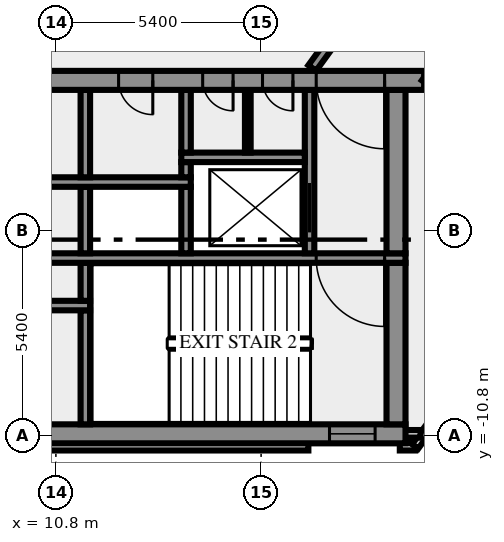
"""IFC4 building model, lengths in metres.
Left out: names, types, materials, properties, quantities, classifications, styles, units other than length and angle.
Written with IfcOpenShell. Run it as: python <this file> out.ifc"""

import sys

from ifc_helpers import new_model, si_unit, direction, frame, frame_2d, origin, place, context, subcontext, project, spatial, rectangle, extrude, element, fill, save


model = new_model("IFC4")
c1 = context("Model", 3, precision=1e-05, world=origin(), true_north=direction((0.0, 1.0)))
c2 = subcontext(c1, "Body", "Model", "MODEL_VIEW")
j1 = project(units=[si_unit("LENGTHUNIT", "METRE"), si_unit("PLANEANGLEUNIT", "RADIAN")], contexts=[c1])
p1 = place(None, origin())
s1 = spatial("IfcSite", under=j1, at=p1, CompositionType="ELEMENT")
p2 = place(p1, origin())
s2 = spatial("IfcBuilding", under=s1, at=p2, CompositionType="ELEMENT")
p3 = place(p2, frame((0.0, 0.0, 261.0)))
s3 = spatial("IfcBuildingStorey", under=s2, at=p3, CompositionType="ELEMENT", Elevation=261.0)
p4 = place(p3, frame((-17.444, -11.088, 0.0), z_axis=(0.0, 0.0, 1.0), x_axis=(1.0, 0.0, 0.0)))
e1 = element("IfcWall", 1, at=p4, inside=s3, PredefinedType="SOLIDWALL", context=c2, shape_type="SweptSolid", body=[
    extrude(rectangle(XDim=34.888, YDim=0.2, at=frame_2d((17.444, 0.0))), origin(), (0.0, 0.0, 1.0), 3.65),
])
p5 = place(p3, frame((19.85, -11.088, 0.0), z_axis=(0.0, 0.0, 1.0), x_axis=(1.0, 0.0, 0.0)))
e2 = element("IfcWall", 2, at=p5, inside=s3, PredefinedType="SOLIDWALL", context=c2, shape_type="SweptSolid", body=[
    extrude(rectangle(XDim=0.406, YDim=0.2, at=frame_2d((0.203, 0.0))), origin(), (0.0, 0.0, 1.0), 3.65),
])
p6 = place(p3, frame((20.253, -11.083, 0.0), z_axis=(0.0, 0.0, 1.0), x_axis=(0.587766567315, 0.809030569476, 0.0)))
e3 = element("IfcWall", 3, at=p6, inside=s3, PredefinedType="SOLIDWALL", context=c2, shape_type="SweptSolid", body=[
    extrude(rectangle(XDim=2.688, YDim=0.2, at=frame_2d((1.344, 0.0))), origin(), (0.0, 0.0, 1.0), 3.65),
])
p7 = place(p3, frame((19.98, -10.75, 0.0), z_axis=(0.0, 0.0, 1.0), x_axis=(1.0, 0.0, 0.0)))
e4 = element("IfcWall", 4, at=p7, inside=s3, PredefinedType="SOLIDWALL", context=c2, shape_type="SweptSolid", body=[
    extrude(rectangle(XDim=0.417, YDim=0.2, at=frame_2d((0.208, 0.0))), origin(), (0.0, 0.0, 1.0), 3.65),
])
p8 = place(p3, frame((-20.0, -10.75, 0.0), z_axis=(0.0, 0.0, 1.0), x_axis=(1.0, 0.0, 0.0)))
e5 = element("IfcWall", 5, at=p8, inside=s3, PredefinedType="SHEAR", context=c2, shape_type="SweptSolid", body=[
    extrude(rectangle(XDim=40.0, YDim=0.5, at=frame_2d((20.0, 0.0))), origin(), (0.0, 0.0, 1.0), 3.65),
])
p9 = place(p8, frame((0.8, 0.0, 1.0)))
e6 = element("IfcOpeningElement", 6, at=p9, cuts=e5, PredefinedType="OPENING", context=c2, shape_type="SweptSolid", body=[
    extrude(rectangle(XDim=1.2, YDim=1.2, at=frame_2d((0.6, 0.6))), frame((0.0, 0.26, 0.0), z_axis=(0.0, -1.0, 0.0), x_axis=(1.0, 0.0, 0.0)), (0.0, 0.0, 1.0), 0.52),
])
p10 = place(p8, frame((38.0, 0.0, 1.0)))
e7 = element("IfcOpeningElement", 7, at=p10, cuts=e5, PredefinedType="OPENING", context=c2, shape_type="SweptSolid", body=[
    extrude(rectangle(XDim=1.2, YDim=1.2, at=frame_2d((0.6, 0.6))), frame((0.0, 0.26, 0.0), z_axis=(0.0, -1.0, 0.0), x_axis=(1.0, 0.0, 0.0)), (0.0, 0.0, 1.0), 0.52),
])
p11 = place(p3, frame((11.575, -10.5, 0.0), z_axis=(0.0, 0.0, 1.0), x_axis=(0.0, 1.0, 0.0)))
e8 = element("IfcWall", 8, at=p11, inside=s3, PredefinedType="SHEAR", context=c2, shape_type="SweptSolid", body=[
    extrude(rectangle(XDim=3.0, YDim=0.25, at=frame_2d((1.5, 0.0))), origin(), (0.0, 0.0, 1.0), 3.65),
])
p12 = place(p3, frame((19.75, -10.5, 0.0), z_axis=(0.0, 0.0, 1.0), x_axis=(0.0, 1.0, 0.0)))
e9 = element("IfcWall", 9, at=p12, inside=s3, PredefinedType="SHEAR", context=c2, shape_type="SweptSolid", body=[
    extrude(rectangle(XDim=4.25, YDim=0.5, at=frame_2d((2.125, 0.0))), origin(), (0.0, 0.0, 1.0), 3.65),
])
p13 = place(p3, frame((11.7, -7.375, 0.0), z_axis=(0.0, 0.0, 1.0), x_axis=(-1.0, 0.0, 0.0)))
e10 = element("IfcWall", 10, at=p13, inside=s3, PredefinedType="SHEAR", context=c2, shape_type="SweptSolid", body=[
    extrude(rectangle(XDim=23.4, YDim=0.25, at=frame_2d((11.7, 0.0))), origin(), (0.0, 0.0, 1.0), 3.65),
])
p14 = place(p13, frame((22.225, 0.0, 0.0)))
e11 = element("IfcOpeningElement", 11, at=p14, cuts=e10, PredefinedType="OPENING", context=c2, shape_type="SweptSolid", body=[
    extrude(rectangle(XDim=0.8, YDim=2.1, at=frame_2d((0.4, 1.05))), frame((0.0, 0.135, 0.0), z_axis=(0.0, -1.0, 0.0), x_axis=(1.0, 0.0, 0.0)), (0.0, 0.0, 1.0), 0.27),
])
p15 = place(p13, frame((20.2, 0.0, 0.0)))
e12 = element("IfcOpeningElement", 12, at=p15, cuts=e10, PredefinedType="OPENING", context=c2, shape_type="SweptSolid", body=[
    extrude(rectangle(XDim=1.1, YDim=2.1, at=frame_2d((0.55, 1.05))), frame((0.0, 0.135, 0.0), z_axis=(0.0, -1.0, 0.0), x_axis=(1.0, 0.0, 0.0)), (0.0, 0.0, 1.0), 0.27),
])
p16 = place(p13, frame((17.7, 0.0, 0.0)))
e13 = element("IfcOpeningElement", 13, at=p16, cuts=e10, PredefinedType="OPENING", context=c2, shape_type="SweptSolid", body=[
    extrude(rectangle(XDim=1.1, YDim=2.1, at=frame_2d((0.55, 1.05))), frame((0.0, 0.135, 0.0), z_axis=(0.0, -1.0, 0.0), x_axis=(1.0, 0.0, 0.0)), (0.0, 0.0, 1.0), 0.27),
])
p17 = place(p13, frame((15.975, 0.0, 0.0)))
e14 = element("IfcOpeningElement", 14, at=p17, cuts=e10, PredefinedType="OPENING", context=c2, shape_type="SweptSolid", body=[
    extrude(rectangle(XDim=0.8, YDim=2.1, at=frame_2d((0.4, 1.05))), frame((0.0, 0.135, 0.0), z_axis=(0.0, -1.0, 0.0), x_axis=(1.0, 0.0, 0.0)), (0.0, 0.0, 1.0), 0.27),
])
p18 = place(p13, frame((14.75, 0.0, 0.0)))
e15 = element("IfcOpeningElement", 15, at=p18, cuts=e10, PredefinedType="OPENING", context=c2, shape_type="SweptSolid", body=[
    extrude(rectangle(XDim=0.7, YDim=2.1, at=frame_2d((0.35, 1.05))), frame((0.0, 0.135, 0.0), z_axis=(0.0, -1.0, 0.0), x_axis=(1.0, 0.0, 0.0)), (0.0, 0.0, 1.0), 0.27),
])
p19 = place(p13, frame((13.35, 0.0, 0.0)))
e16 = element("IfcOpeningElement", 16, at=p19, cuts=e10, PredefinedType="OPENING", context=c2, shape_type="SweptSolid", body=[
    extrude(rectangle(XDim=0.9, YDim=2.1, at=frame_2d((0.45, 1.05))), frame((0.0, 0.135, 0.0), z_axis=(0.0, -1.0, 0.0), x_axis=(1.0, 0.0, 0.0)), (0.0, 0.0, 1.0), 0.27),
])
p20 = place(p13, frame((11.975, 0.0, 0.0)))
e17 = element("IfcOpeningElement", 17, at=p20, cuts=e10, PredefinedType="OPENING", context=c2, shape_type="SweptSolid", body=[
    extrude(rectangle(XDim=0.9, YDim=2.1, at=frame_2d((0.45, 1.05))), frame((0.0, 0.135, 0.0), z_axis=(0.0, -1.0, 0.0), x_axis=(1.0, 0.0, 0.0)), (0.0, 0.0, 1.0), 0.27),
])
p21 = place(p13, frame((10.5, 0.0, 0.0)))
e18 = element("IfcOpeningElement", 18, at=p21, cuts=e10, PredefinedType="OPENING", context=c2, shape_type="SweptSolid", body=[
    extrude(rectangle(XDim=0.9, YDim=2.1, at=frame_2d((0.45, 1.05))), frame((0.0, 0.135, 0.0), z_axis=(0.0, -1.0, 0.0), x_axis=(1.0, 0.0, 0.0)), (0.0, 0.0, 1.0), 0.27),
])
p22 = place(p13, frame((8.388, 0.0, 0.0)))
e19 = element("IfcOpeningElement", 19, at=p22, cuts=e10, PredefinedType="OPENING", context=c2, shape_type="SweptSolid", body=[
    extrude(rectangle(XDim=0.9, YDim=2.1, at=frame_2d((0.45, 1.05))), frame((0.0, 0.135, 0.0), z_axis=(0.0, -1.0, 0.0), x_axis=(1.0, 0.0, 0.0)), (0.0, 0.0, 1.0), 0.27),
])
p23 = place(p13, frame((5.375, 0.0, 0.0)))
e20 = element("IfcOpeningElement", 20, at=p23, cuts=e10, PredefinedType="OPENING", context=c2, shape_type="SweptSolid", body=[
    extrude(rectangle(XDim=0.9, YDim=2.1, at=frame_2d((0.45, 1.05))), frame((0.0, 0.135, 0.0), z_axis=(0.0, -1.0, 0.0), x_axis=(1.0, 0.0, 0.0)), (0.0, 0.0, 1.0), 0.27),
])
p24 = place(p13, frame((1.688, 0.0, 0.0)))
e21 = element("IfcOpeningElement", 21, at=p24, cuts=e10, PredefinedType="OPENING", context=c2, shape_type="SweptSolid", body=[
    extrude(rectangle(XDim=0.9, YDim=2.1, at=frame_2d((0.45, 1.05))), frame((0.0, 0.135, 0.0), z_axis=(0.0, -1.0, 0.0), x_axis=(1.0, 0.0, 0.0)), (0.0, 0.0, 1.0), 0.27),
])
p25 = place(p3, frame((11.575, -7.25, 0.0), z_axis=(0.0, 0.0, 1.0), x_axis=(0.0, 1.0, 0.0)))
e22 = element("IfcWall", 22, at=p25, inside=s3, PredefinedType="SHEAR", context=c2, shape_type="SweptSolid", body=[
    extrude(rectangle(XDim=1.0, YDim=0.25, at=frame_2d((0.5, 0.0))), origin(), (0.0, 0.0, 1.0), 3.65),
])
p26 = place(p3, frame((20.0, -6.125, 0.0), z_axis=(0.0, 0.0, 1.0), x_axis=(-1.0, 0.0, 0.0)))
e23 = element("IfcWall", 23, at=p26, inside=s3, PredefinedType="SHEAR", context=c2, shape_type="SweptSolid", body=[
    extrude(rectangle(XDim=10.2, YDim=0.25, at=frame_2d((5.1, 0.0))), origin(), (0.0, 0.0, 1.0), 3.65),
])
p27 = place(p26, frame((0.55, 0.0, 0.0)))
e24 = element("IfcOpeningElement", 24, at=p27, cuts=e23, PredefinedType="OPENING", context=c2, shape_type="SweptSolid", body=[
    extrude(rectangle(XDim=1.8, YDim=2.1, at=frame_2d((0.9, 1.05))), frame((0.0, 0.135, 0.0), z_axis=(0.0, -1.0, 0.0), x_axis=(1.0, 0.0, 0.0)), (0.0, 0.0, 1.0), 0.27),
])
for number, where, z_axis, x_axis in (
    (25, (11.575, -6.0, 0.0), (0.0, 0.0, 1.0), (0.0, 1.0, 0.0)),
    (26, (14.225, -6.0, 0.0), (0.0, 0.0, 1.0), (0.0, 1.0, 0.0)),
):
    element("IfcWall", number, at=place(p3, frame(where, z_axis=z_axis, x_axis=x_axis)), inside=s3, PredefinedType="SHEAR", context=c2, shape_type="SweptSolid", body=[
        extrude(rectangle(XDim=1.75, YDim=0.25, at=frame_2d((0.875, 0.0))), origin(), (0.0, 0.0, 1.0), 3.65),
    ])
p28 = place(p3, frame((17.475, -6.0, 0.0), z_axis=(0.0, 0.0, 1.0), x_axis=(0.0, 1.0, 0.0)))
e27 = element("IfcWall", 27, at=p28, inside=s3, PredefinedType="SHEAR", context=c2, shape_type="SweptSolid", body=[
    extrude(rectangle(XDim=4.3, YDim=0.25, at=frame_2d((2.15, 0.0))), origin(), (0.0, 0.0, 1.0), 3.65),
])
p29 = place(p28, frame((0.55, 0.0, 0.0)))
e28 = element("IfcOpeningElement", 28, at=p29, cuts=e27, PredefinedType="OPENING", context=c2, shape_type="SweptSolid", body=[
    extrude(rectangle(XDim=1.3, YDim=2.1, at=frame_2d((0.65, 1.05))), frame((0.0, 0.135, 0.0), z_axis=(0.0, -1.0, 0.0), x_axis=(1.0, 0.0, 0.0)), (0.0, 0.0, 1.0), 0.27),
])
p30 = place(p3, frame((19.75, -6.0, 0.0), z_axis=(0.0, 0.0, 1.0), x_axis=(0.0, 1.0, 0.0)))
e29 = element("IfcWall", 29, at=p30, inside=s3, PredefinedType="SHEAR", context=c2, shape_type="SweptSolid", body=[
    extrude(rectangle(XDim=4.3, YDim=0.5, at=frame_2d((2.15, 0.0))), origin(), (0.0, 0.0, 1.0), 3.65),
])
p31 = place(p3, frame((-0.6, -4.125, 0.0), z_axis=(0.0, 0.0, 1.0), x_axis=(1.0, 0.0, 0.0)))
e30 = element("IfcWall", 30, at=p31, inside=s3, PredefinedType="SHEAR", context=c2, shape_type="SweptSolid", body=[
    extrude(rectangle(XDim=14.95, YDim=0.25, at=frame_2d((7.475, 0.0))), origin(), (0.0, 0.0, 1.0), 3.65),
])
p32 = place(p31, frame((2.75, 0.0, 0.0)))
e31 = element("IfcOpeningElement", 31, at=p32, cuts=e30, PredefinedType="OPENING", context=c2, shape_type="SweptSolid", body=[
    extrude(rectangle(XDim=1.3, YDim=2.1, at=frame_2d((0.65, 1.05))), frame((0.0, 0.135, 0.0), z_axis=(0.0, -1.0, 0.0), x_axis=(1.0, 0.0, 0.0)), (0.0, 0.0, 1.0), 0.27),
])
p33 = place(p3, frame((11.575, -4.0, 0.0), z_axis=(0.0, 0.0, 1.0), x_axis=(0.0, 1.0, 0.0)))
e32 = element("IfcWall", 32, at=p33, inside=s3, PredefinedType="SHEAR", context=c2, shape_type="SweptSolid", body=[
    extrude(rectangle(XDim=2.3, YDim=0.25, at=frame_2d((1.15, 0.0))), origin(), (0.0, 0.0, 1.0), 3.65),
])
p34 = place(p3, frame((14.225, -4.0, 0.0), z_axis=(0.0, 0.0, 1.0), x_axis=(0.0, 1.0, 0.0)))
e33 = element("IfcWall", 33, at=p34, inside=s3, PredefinedType="SHEAR", context=c2, shape_type="SweptSolid", body=[
    extrude(rectangle(XDim=0.4, YDim=0.25, at=frame_2d((0.2, 0.0))), origin(), (0.0, 0.0, 1.0), 3.65),
])
p35 = place(p3, frame((14.1, -3.475, 0.0), z_axis=(0.0, 0.0, 1.0), x_axis=(1.0, 0.0, 0.0)))
e34 = element("IfcWall", 34, at=p35, inside=s3, PredefinedType="SHEAR", context=c2, shape_type="SweptSolid", body=[
    extrude(rectangle(XDim=3.25, YDim=0.25, at=frame_2d((1.625, 0.0))), origin(), (0.0, 0.0, 1.0), 3.65),
])
p36 = place(p3, frame((14.225, -3.35, 0.0), z_axis=(0.0, 0.0, 1.0), x_axis=(0.0, 1.0, 0.0)))
e35 = element("IfcWall", 35, at=p36, inside=s3, PredefinedType="SHEAR", context=c2, shape_type="SweptSolid", body=[
    extrude(rectangle(XDim=1.65, YDim=0.25, at=frame_2d((0.825, 0.0))), origin(), (0.0, 0.0, 1.0), 3.65),
])
p37 = place(p3, frame((15.85, -3.35, 0.0), z_axis=(0.0, 0.0, 1.0), x_axis=(0.0, 1.0, 0.0)))
e36 = element("IfcWall", 36, at=p37, inside=s3, PredefinedType="PARTITIONING", context=c2, shape_type="SweptSolid", body=[
    extrude(rectangle(XDim=1.65, YDim=0.15, at=frame_2d((0.825, 0.0))), origin(), (0.0, 0.0, 1.0), 3.65),
])
p38 = place(p3, frame((20.49, -1.45, 0.0), z_axis=(0.0, 0.0, 1.0), x_axis=(-1.0, 0.0, 0.0)))
e37 = element("IfcWall", 37, at=p38, inside=s3, PredefinedType="SHEAR", context=c2, shape_type="SweptSolid", body=[
    extrude(rectangle(XDim=40.98, YDim=0.5, at=frame_2d((20.49, 0.0))), origin(), (0.0, 0.0, 1.0), 3.65),
])
p39 = place(p38, frame((38.14, 0.0, 0.0)))
e38 = element("IfcOpeningElement", 38, at=p39, cuts=e37, PredefinedType="OPENING", context=c2, shape_type="SweptSolid", body=[
    extrude(rectangle(XDim=1.8, YDim=2.1, at=frame_2d((0.9, 1.05))), frame((0.0, 0.26, 0.0), z_axis=(0.0, -1.0, 0.0), x_axis=(1.0, 0.0, 0.0)), (0.0, 0.0, 1.0), 0.52),
])
p40 = place(p38, frame((35.89, 0.0, 0.0)))
e39 = element("IfcOpeningElement", 39, at=p40, cuts=e37, PredefinedType="OPENING", context=c2, shape_type="SweptSolid", body=[
    extrude(rectangle(XDim=0.9, YDim=2.1, at=frame_2d((0.45, 1.05))), frame((0.0, 0.26, 0.0), z_axis=(0.0, -1.0, 0.0), x_axis=(1.0, 0.0, 0.0)), (0.0, 0.0, 1.0), 0.52),
])
p41 = place(p38, frame((32.94, 0.0, 0.0)))
e40 = element("IfcOpeningElement", 40, at=p41, cuts=e37, PredefinedType="OPENING", context=c2, shape_type="SweptSolid", body=[
    extrude(rectangle(XDim=0.9, YDim=2.1, at=frame_2d((0.45, 1.05))), frame((0.0, 0.26, 0.0), z_axis=(0.0, -1.0, 0.0), x_axis=(1.0, 0.0, 0.0)), (0.0, 0.0, 1.0), 0.52),
])
p42 = place(p38, frame((31.015, 0.0, 0.0)))
e41 = element("IfcOpeningElement", 41, at=p42, cuts=e37, PredefinedType="OPENING", context=c2, shape_type="SweptSolid", body=[
    extrude(rectangle(XDim=0.8, YDim=2.1, at=frame_2d((0.4, 1.05))), frame((0.0, 0.26, 0.0), z_axis=(0.0, -1.0, 0.0), x_axis=(1.0, 0.0, 0.0)), (0.0, 0.0, 1.0), 0.52),
])
p43 = place(p38, frame((24.765, 0.0, 0.0)))
e42 = element("IfcOpeningElement", 42, at=p43, cuts=e37, PredefinedType="OPENING", context=c2, shape_type="SweptSolid", body=[
    extrude(rectangle(XDim=0.8, YDim=2.1, at=frame_2d((0.4, 1.05))), frame((0.0, 0.26, 0.0), z_axis=(0.0, -1.0, 0.0), x_axis=(1.0, 0.0, 0.0)), (0.0, 0.0, 1.0), 0.52),
])
p44 = place(p38, frame((21.765, 0.0, 0.0)))
e43 = element("IfcOpeningElement", 43, at=p44, cuts=e37, PredefinedType="OPENING", context=c2, shape_type="SweptSolid", body=[
    extrude(rectangle(XDim=2.0, YDim=2.1, at=frame_2d((1.0, 1.05))), frame((0.0, 0.26, 0.0), z_axis=(0.0, -1.0, 0.0), x_axis=(1.0, 0.0, 0.0)), (0.0, 0.0, 1.0), 0.52),
])
p45 = place(p38, frame((14.202, 0.0, 0.0)))
e44 = element("IfcOpeningElement", 44, at=p45, cuts=e37, PredefinedType="OPENING", context=c2, shape_type="SweptSolid", body=[
    extrude(rectangle(XDim=0.9, YDim=2.1, at=frame_2d((0.45, 1.05))), frame((0.0, 0.26, 0.0), z_axis=(0.0, -1.0, 0.0), x_axis=(1.0, 0.0, 0.0)), (0.0, 0.0, 1.0), 0.52),
])
p46 = place(p38, frame((10.478, 0.0, 0.0)))
e45 = element("IfcOpeningElement", 45, at=p46, cuts=e37, PredefinedType="OPENING", context=c2, shape_type="SweptSolid", body=[
    extrude(rectangle(XDim=0.9, YDim=2.1, at=frame_2d((0.45, 1.05))), frame((0.0, 0.26, 0.0), z_axis=(0.0, -1.0, 0.0), x_axis=(1.0, 0.0, 0.0)), (0.0, 0.0, 1.0), 0.52),
])
p47 = place(p38, frame((7.14, 0.0, 0.0)))
e46 = element("IfcOpeningElement", 46, at=p47, cuts=e37, PredefinedType="OPENING", context=c2, shape_type="SweptSolid", body=[
    extrude(rectangle(XDim=0.9, YDim=2.1, at=frame_2d((0.45, 1.05))), frame((0.0, 0.26, 0.0), z_axis=(0.0, -1.0, 0.0), x_axis=(1.0, 0.0, 0.0)), (0.0, 0.0, 1.0), 0.52),
])
p48 = place(p38, frame((5.028, 0.0, 0.0)))
e47 = element("IfcOpeningElement", 47, at=p48, cuts=e37, PredefinedType="OPENING", context=c2, shape_type="SweptSolid", body=[
    extrude(rectangle(XDim=0.8, YDim=2.1, at=frame_2d((0.4, 1.05))), frame((0.0, 0.26, 0.0), z_axis=(0.0, -1.0, 0.0), x_axis=(1.0, 0.0, 0.0)), (0.0, 0.0, 1.0), 0.52),
])
p49 = place(p38, frame((3.452, 0.0, 0.0)))
e48 = element("IfcOpeningElement", 48, at=p49, cuts=e37, PredefinedType="OPENING", context=c2, shape_type="SweptSolid", body=[
    extrude(rectangle(XDim=0.8, YDim=2.1, at=frame_2d((0.4, 1.05))), frame((0.0, 0.26, 0.0), z_axis=(0.0, -1.0, 0.0), x_axis=(1.0, 0.0, 0.0)), (0.0, 0.0, 1.0), 0.52),
])
p50 = place(p38, frame((1.04, 0.0, 0.0)))
e49 = element("IfcOpeningElement", 49, at=p50, cuts=e37, PredefinedType="OPENING", context=c2, shape_type="SweptSolid", body=[
    extrude(rectangle(XDim=1.8, YDim=2.1, at=frame_2d((0.9, 1.05))), frame((0.0, 0.26, 0.0), z_axis=(0.0, -1.0, 0.0), x_axis=(1.0, 0.0, 0.0)), (0.0, 0.0, 1.0), 0.52),
])
p51 = place(p3, frame((17.545, -1.125, 0.0), z_axis=(0.0, 0.0, 1.0), x_axis=(0.587796810203, 0.809008596935, 0.0)))
e50 = element("IfcWall", 50, at=p51, inside=s3, PredefinedType="SOLIDWALL", context=c2, shape_type="SweptSolid", body=[
    extrude(rectangle(XDim=12.703, YDim=0.25, at=frame_2d((6.352, 0.0))), origin(), (0.0, 0.0, 1.0), 3.65),
])
p52 = place(p51, frame((3.441, 0.0, 0.0)))
e51 = element("IfcOpeningElement", 51, at=p52, cuts=e50, PredefinedType="OPENING", context=c2, shape_type="SweptSolid", body=[
    extrude(rectangle(XDim=0.9, YDim=2.1, at=frame_2d((0.45, 1.05))), frame((0.0, 0.135, 0.0), z_axis=(0.0, -1.0, 0.0), x_axis=(1.0, 0.0, 0.0)), (0.0, 0.0, 1.0), 0.27),
])
p53 = place(p3, frame((27.009, 7.392, 0.0), z_axis=(0.0, 0.0, 1.0), x_axis=(-0.587776457057, -0.809023384414, 0.0)))
e52 = element("IfcWall", 52, at=p53, inside=s3, PredefinedType="SOLIDWALL", context=c2, shape_type="SweptSolid", body=[
    extrude(rectangle(XDim=11.021, YDim=0.25, at=frame_2d((5.51, 0.0))), origin(), (0.0, 0.0, 1.0), 3.65),
])
p54 = place(p53, frame((0.225, 0.0, 0.0)))
e53 = element("IfcOpeningElement", 53, at=p54, cuts=e52, PredefinedType="OPENING", context=c2, shape_type="SweptSolid", body=[
    extrude(rectangle(XDim=0.9, YDim=2.1, at=frame_2d((0.45, 1.05))), frame((0.0, 0.135, 0.0), z_axis=(0.0, -1.0, 0.0), x_axis=(1.0, 0.0, 0.0)), (0.0, 0.0, 1.0), 0.27),
])
p55 = place(p10, origin())
e54 = element("IfcWindow", 54, at=p55, inside=s3, PartitioningType="SINGLE_PANEL", PredefinedType="WINDOW", context=c2, shape_type="SweptSolid", body=[
    extrude(rectangle(XDim=1.2, YDim=1.2, at=frame_2d((0.6, 0.6))), frame((0.0, 0.03, 0.0), z_axis=(0.0, -1.0, 0.0), x_axis=(1.0, 0.0, 0.0)), (0.0, 0.0, 1.0), 0.06),
])
fill(e7, e54)
p56 = place(p27, origin())
e55 = element("IfcDoor", 55, at=p56, inside=s3, OperationType="DOUBLE_DOOR_SINGLE_SWING", PredefinedType="DOOR", context=c2, shape_type="SweptSolid", body=[
    extrude(rectangle(XDim=1.8, YDim=2.1, at=frame_2d((0.9, 1.05))), frame((0.0, 0.025, 0.0), z_axis=(0.0, -1.0, 0.0), x_axis=(1.0, 0.0, 0.0)), (0.0, 0.0, 1.0), 0.05),
])
fill(e24, e55)
p57 = place(p29, origin())
e56 = element("IfcDoor", 56, at=p57, inside=s3, OperationType="DOUBLE_DOOR_SLIDING", PredefinedType="DOOR", context=c2, shape_type="SweptSolid", body=[
    extrude(rectangle(XDim=1.3, YDim=2.1, at=frame_2d((0.65, 1.05))), frame((0.0, 0.025, 0.0), z_axis=(0.0, -1.0, 0.0), x_axis=(1.0, 0.0, 0.0)), (0.0, 0.0, 1.0), 0.05),
])
fill(e28, e56)
p58 = place(p47, origin())
e57 = element("IfcDoor", 57, at=p58, inside=s3, OperationType="SINGLE_SWING_LEFT", PredefinedType="DOOR", context=c2, shape_type="SweptSolid", body=[
    extrude(rectangle(XDim=0.9, YDim=2.1, at=frame_2d((0.45, 1.05))), frame((0.0, 0.025, 0.0), z_axis=(0.0, -1.0, 0.0), x_axis=(1.0, 0.0, 0.0)), (0.0, 0.0, 1.0), 0.05),
])
fill(e46, e57)
p59 = place(p48, origin())
e58 = element("IfcDoor", 58, at=p59, inside=s3, OperationType="SINGLE_SWING_LEFT", PredefinedType="DOOR", context=c2, shape_type="SweptSolid", body=[
    extrude(rectangle(XDim=0.8, YDim=2.1, at=frame_2d((0.4, 1.05))), frame((0.0, 0.025, 0.0), z_axis=(0.0, -1.0, 0.0), x_axis=(1.0, 0.0, 0.0)), (0.0, 0.0, 1.0), 0.05),
])
fill(e47, e58)
p60 = place(p49, origin())
e59 = element("IfcDoor", 59, at=p60, inside=s3, OperationType="SINGLE_SWING_LEFT", PredefinedType="DOOR", context=c2, shape_type="SweptSolid", body=[
    extrude(rectangle(XDim=0.8, YDim=2.1, at=frame_2d((0.4, 1.05))), frame((0.0, 0.025, 0.0), z_axis=(0.0, -1.0, 0.0), x_axis=(1.0, 0.0, 0.0)), (0.0, 0.0, 1.0), 0.05),
])
fill(e48, e59)
p61 = place(p50, origin())
e60 = element("IfcDoor", 60, at=p61, inside=s3, OperationType="DOUBLE_DOOR_SINGLE_SWING", PredefinedType="DOOR", context=c2, shape_type="SweptSolid", body=[
    extrude(rectangle(XDim=1.8, YDim=2.1, at=frame_2d((0.9, 1.05))), frame((0.0, 0.025, 0.0), z_axis=(0.0, -1.0, 0.0), x_axis=(1.0, 0.0, 0.0)), (0.0, 0.0, 1.0), 0.05),
])
fill(e49, e60)
save(model, sys.argv[1])
